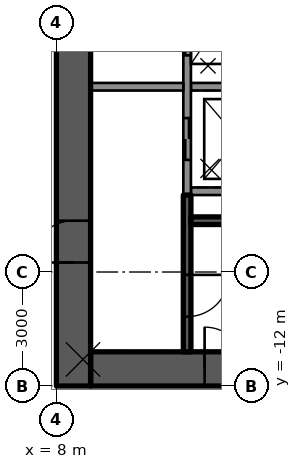
"""IFC4 building model, lengths in metres.
Left out: names, types, materials, properties, quantities, classifications, styles, units other than length and angle.
Written with IfcOpenShell. Run it as: python <this file> out.ifc"""

import sys

from ifc_helpers import new_model, si_unit, direction, frame, frame_2d, origin, place, context, subcontext, project, spatial, rectangle, extrude, element, fill, save


model = new_model("IFC4")
c1 = context("Model", 3, precision=1e-05, world=origin(), true_north=direction((0.0, 1.0)))
c2 = subcontext(c1, "Body", "Model", "MODEL_VIEW")
j1 = project(units=[si_unit("LENGTHUNIT", "METRE"), si_unit("PLANEANGLEUNIT", "RADIAN")], contexts=[c1])
p1 = place(None, origin())
s1 = spatial("IfcSite", under=j1, at=p1, CompositionType="ELEMENT")
p2 = place(p1, origin())
s2 = spatial("IfcBuilding", under=s1, at=p2, CompositionType="ELEMENT")
p3 = place(p2, frame((0.0, 0.0, 20.5)))
s3 = spatial("IfcBuildingStorey", under=s2, at=p3, CompositionType="ELEMENT", Elevation=20.5)
p4 = place(p3, frame((8.9, -11.55, 0.0), z_axis=(0.0, 0.0, 1.0), x_axis=(1.0, 0.0, 0.0)))
e1 = element("IfcWall", 1, at=p4, inside=s3, PredefinedType="SHEAR", context=c2, shape_type="SweptSolid", body=[
    extrude(rectangle(XDim=9.2, YDim=0.9, at=frame_2d((4.6, 0.0))), origin(), (0.0, 0.0, 1.0), 4.6),
])
p5 = place(p4, frame((3.0, 0.0, 0.0)))
e2 = element("IfcOpeningElement", 2, at=p5, cuts=e1, PredefinedType="OPENING", context=c2, shape_type="SweptSolid", body=[
    extrude(rectangle(XDim=1.1, YDim=2.1, at=frame_2d((0.55, 1.05))), frame((0.0, 0.46, 0.0), z_axis=(0.0, -1.0, 0.0), x_axis=(1.0, 0.0, 0.0)), (0.0, 0.0, 1.0), 0.92),
])
p6 = place(p3, frame((8.45, -12.0, 0.0), z_axis=(0.0, 0.0, 1.0), x_axis=(0.0, 1.0, 0.0)))
e3 = element("IfcWall", 3, at=p6, inside=s3, PredefinedType="SHEAR", context=c2, shape_type="SweptSolid", body=[
    extrude(rectangle(XDim=24.0, YDim=0.9, at=frame_2d((12.0, 0.0))), origin(), (0.0, 0.0, 1.0), 4.6),
])
p7 = place(p6, frame((12.6, 0.0, 0.0)))
e4 = element("IfcOpeningElement", 4, at=p7, cuts=e3, PredefinedType="OPENING", context=c2, shape_type="SweptSolid", body=[
    extrude(rectangle(XDim=1.8, YDim=2.1, at=frame_2d((0.9, 1.05))), frame((0.0, 0.46, 0.0), z_axis=(0.0, -1.0, 0.0), x_axis=(1.0, 0.0, 0.0)), (0.0, 0.0, 1.0), 0.92),
])
p8 = place(p6, frame((3.25, 0.0, 0.0)))
e5 = element("IfcOpeningElement", 5, at=p8, cuts=e3, PredefinedType="OPENING", context=c2, shape_type="SweptSolid", body=[
    extrude(rectangle(XDim=1.1, YDim=2.1, at=frame_2d((0.55, 1.05))), frame((0.0, 0.46, 0.0), z_axis=(0.0, -1.0, 0.0), x_axis=(1.0, 0.0, 0.0)), (0.0, 0.0, 1.0), 0.92),
])
p9 = place(p3, frame((11.54, -6.875, 0.0), z_axis=(0.0, 0.0, 1.0), x_axis=(1.0, 0.0, 0.0)))
e6 = element("IfcWall", 6, at=p9, inside=s3, PredefinedType="SOLIDWALL", context=c2, shape_type="SweptSolid", body=[
    extrude(rectangle(XDim=6.56, YDim=0.2, at=frame_2d((3.28, 0.0))), origin(), (0.0, 0.0, 1.0), 4.18),
])
p10 = place(p3, frame((11.54, -4.125, 0.0), z_axis=(0.0, 0.0, 1.0), x_axis=(1.0, 0.0, 0.0)))
e7 = element("IfcWall", 7, at=p10, inside=s3, PredefinedType="SOLIDWALL", context=c2, shape_type="SweptSolid", body=[
    extrude(rectangle(XDim=4.7, YDim=0.2, at=frame_2d((2.35, 0.0))), origin(), (0.0, 0.0, 1.0), 4.18),
])
p11 = place(p3, frame((11.44, 6.975, 0.0), z_axis=(0.0, 0.0, 1.0), x_axis=(0.0, -1.0, 0.0)))
e8 = element("IfcWall", 8, at=p11, inside=s3, PredefinedType="SOLIDWALL", context=c2, shape_type="SweptSolid", body=[
    extrude(rectangle(XDim=13.95, YDim=0.2, at=frame_2d((6.975, 0.0))), origin(), (0.0, 0.0, 1.0), 4.18),
])
p12 = place(p11, frame((0.925, 0.0, 0.0)))
e9 = element("IfcOpeningElement", 9, at=p12, cuts=e8, PredefinedType="OPENING", context=c2, shape_type="SweptSolid", body=[
    extrude(rectangle(XDim=1.1, YDim=2.1, at=frame_2d((0.55, 1.05))), frame((0.0, 0.11, 0.0), z_axis=(0.0, -1.0, 0.0), x_axis=(1.0, 0.0, 0.0)), (0.0, 0.0, 1.0), 0.22),
])
p13 = place(p11, frame((6.425, 0.0, 0.0)))
e10 = element("IfcOpeningElement", 10, at=p13, cuts=e8, PredefinedType="OPENING", context=c2, shape_type="SweptSolid", body=[
    extrude(rectangle(XDim=1.1, YDim=2.1, at=frame_2d((0.55, 1.05))), frame((0.0, 0.11, 0.0), z_axis=(0.0, -1.0, 0.0), x_axis=(1.0, 0.0, 0.0)), (0.0, 0.0, 1.0), 0.22),
])
p14 = place(p11, frame((9.175, 0.0, 0.0)))
e11 = element("IfcOpeningElement", 11, at=p14, cuts=e8, PredefinedType="OPENING", context=c2, shape_type="SweptSolid", body=[
    extrude(rectangle(XDim=1.1, YDim=2.1, at=frame_2d((0.55, 1.05))), frame((0.0, 0.11, 0.0), z_axis=(0.0, -1.0, 0.0), x_axis=(1.0, 0.0, 0.0)), (0.0, 0.0, 1.0), 0.22),
])
p15 = place(p11, frame((11.925, 0.0, 0.0)))
e12 = element("IfcOpeningElement", 12, at=p15, cuts=e8, PredefinedType="OPENING", context=c2, shape_type="SweptSolid", body=[
    extrude(rectangle(XDim=1.1, YDim=2.1, at=frame_2d((0.55, 1.05))), frame((0.0, 0.11, 0.0), z_axis=(0.0, -1.0, 0.0), x_axis=(1.0, 0.0, 0.0)), (0.0, 0.0, 1.0), 0.22),
])
p16 = place(p3, frame((11.44, -6.975, 0.0), z_axis=(0.0, 0.0, 1.0), x_axis=(0.0, -1.0, 0.0)))
e13 = element("IfcWall", 13, at=p16, inside=s3, PredefinedType="SOLIDWALL", context=c2, shape_type="SweptSolid", body=[
    extrude(rectangle(XDim=4.125, YDim=0.2, at=frame_2d((2.062, 0.0))), origin(), (0.0, 0.0, 1.0), 4.18),
])
p17 = place(p16, frame((2.1, 0.0, 0.0)))
e14 = element("IfcOpeningElement", 14, at=p17, cuts=e13, PredefinedType="OPENING", context=c2, shape_type="SweptSolid", body=[
    extrude(rectangle(XDim=1.1, YDim=2.1, at=frame_2d((0.55, 1.05))), frame((0.0, 0.11, 0.0), z_axis=(0.0, -1.0, 0.0), x_axis=(1.0, 0.0, 0.0)), (0.0, 0.0, 1.0), 0.22),
])
p18 = place(p3, frame((11.54, -7.65, 0.0), z_axis=(0.0, 0.0, 1.0), x_axis=(1.0, 0.0, 0.0)))
e15 = element("IfcWall", 15, at=p18, inside=s3, PredefinedType="SOLIDWALL", context=c2, shape_type="SweptSolid", body=[
    extrude(rectangle(XDim=6.56, YDim=0.2, at=frame_2d((3.28, 0.0))), origin(), (0.0, 0.0, 1.0), 4.18),
])
p19 = place(p3, frame((8.9, -4.125, 0.0), z_axis=(0.0, 0.0, 1.0), x_axis=(1.0, 0.0, 0.0)))
e16 = element("IfcWall", 16, at=p19, inside=s3, PredefinedType="PARTITIONING", context=c2, shape_type="SweptSolid", body=[
    extrude(rectangle(XDim=2.44, YDim=0.2, at=frame_2d((1.22, 0.0))), origin(), (0.0, 0.0, 1.0), 4.18),
])
p20 = place(p14, origin())
e17 = element("IfcDoor", 17, at=p20, inside=s3, OperationType="DOUBLE_DOOR_SLIDING", PredefinedType="DOOR", context=c2, shape_type="SweptSolid", body=[
    extrude(rectangle(XDim=1.1, YDim=2.1, at=frame_2d((0.55, 1.05))), frame((0.0, 0.025, 0.0), z_axis=(0.0, -1.0, 0.0), x_axis=(1.0, 0.0, 0.0)), (0.0, 0.0, 1.0), 0.05),
])
fill(e11, e17)
p21 = place(p15, origin())
e18 = element("IfcDoor", 18, at=p21, inside=s3, OperationType="DOUBLE_DOOR_SLIDING", PredefinedType="DOOR", context=c2, shape_type="SweptSolid", body=[
    extrude(rectangle(XDim=1.1, YDim=2.1, at=frame_2d((0.55, 1.05))), frame((0.0, 0.025, 0.0), z_axis=(0.0, -1.0, 0.0), x_axis=(1.0, 0.0, 0.0)), (0.0, 0.0, 1.0), 0.05),
])
fill(e12, e18)
p22 = place(p8, origin())
e19 = element("IfcDoor", 19, at=p22, inside=s3, OperationType="SINGLE_SWING_LEFT", PredefinedType="DOOR", context=c2, shape_type="SweptSolid", body=[
    extrude(rectangle(XDim=1.1, YDim=2.1, at=frame_2d((0.55, 1.05))), frame((0.0, 0.025, 0.0), z_axis=(0.0, -1.0, 0.0), x_axis=(1.0, 0.0, 0.0)), (0.0, 0.0, 1.0), 0.05),
])
fill(e5, e19)
p23 = place(p5, origin())
e20 = element("IfcDoor", 20, at=p23, inside=s3, OperationType="SINGLE_SWING_LEFT", PredefinedType="DOOR", context=c2, shape_type="SweptSolid", body=[
    extrude(rectangle(XDim=1.1, YDim=2.1, at=frame_2d((0.55, 1.05))), frame((0.0, 0.025, 0.0), z_axis=(0.0, -1.0, 0.0), x_axis=(1.0, 0.0, 0.0)), (0.0, 0.0, 1.0), 0.05),
])
fill(e2, e20)
p24 = place(p17, origin())
e21 = element("IfcDoor", 21, at=p24, inside=s3, OperationType="SINGLE_SWING_RIGHT", PredefinedType="DOOR", context=c2, shape_type="SweptSolid", body=[
    extrude(rectangle(XDim=1.1, YDim=2.1, at=frame_2d((0.55, 1.05))), frame((0.0, 0.025, 0.0), z_axis=(0.0, -1.0, 0.0), x_axis=(1.0, 0.0, 0.0)), (0.0, 0.0, 1.0), 0.05),
])
fill(e14, e21)
save(model, sys.argv[1])
